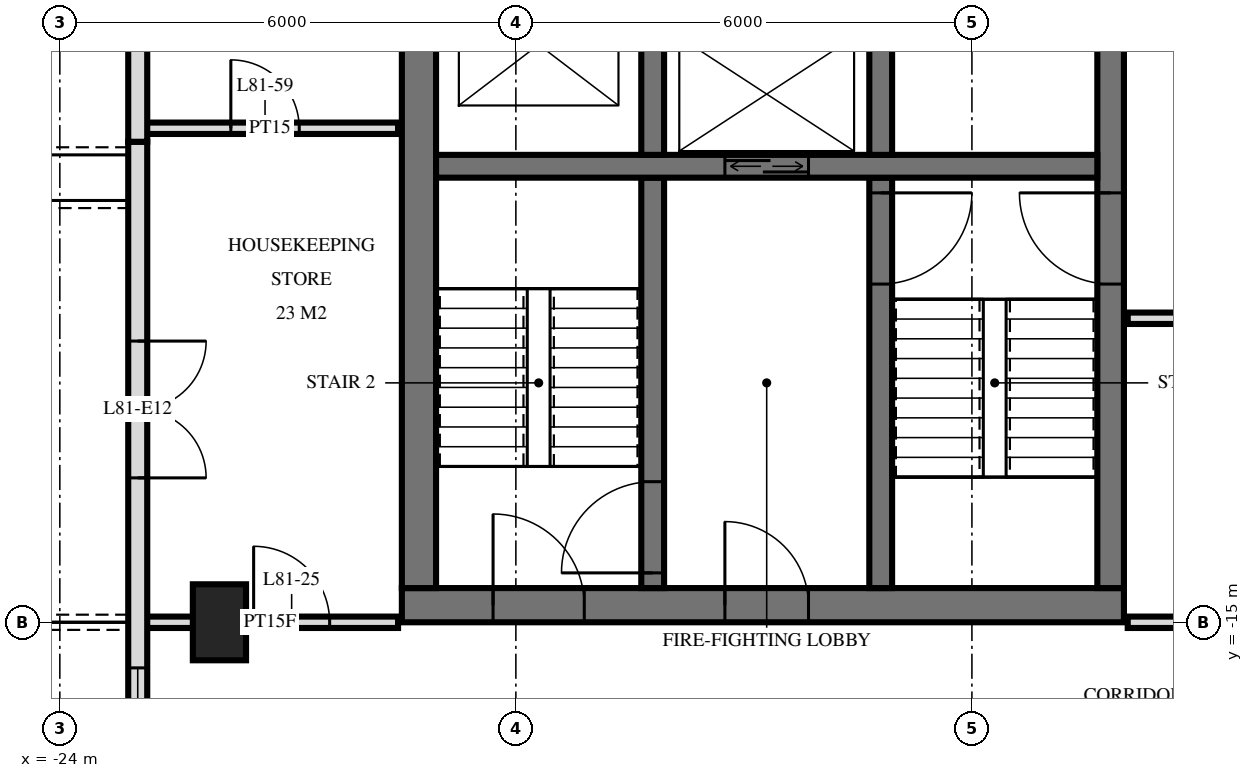
"""IFC4 building model, lengths in metres.
Left out: names, types, materials, properties, quantities, classifications, styles, units other than length and angle.
Written with IfcOpenShell. Run it as: python <this file> out.ifc"""

import sys

from ifc_helpers import new_model, si_unit, direction, frame, frame_2d, origin, origin_2d, place, context, subcontext, project, spatial, rectangle, extrude, element, fill, save


model = new_model("IFC4")
c1 = context("Model", 3, precision=1e-05, world=origin(), true_north=direction((0.0, 1.0)))
c2 = subcontext(c1, "Body", "Model", "MODEL_VIEW")
j1 = project(units=[si_unit("LENGTHUNIT", "METRE"), si_unit("PLANEANGLEUNIT", "RADIAN")], contexts=[c1])
p1 = place(None, origin())
s1 = spatial("IfcSite", under=j1, at=p1, CompositionType="ELEMENT")
p2 = place(p1, origin())
s2 = spatial("IfcBuilding", under=s1, at=p2, CompositionType="ELEMENT")
p3 = place(p2, frame((0.0, 0.0, 305.1)))
s3 = spatial("IfcBuildingStorey", under=s2, at=p3, CompositionType="ELEMENT", Elevation=305.1)
p4 = place(p3, frame((-21.9, -15.0, 0.0), z_axis=(0.0, 0.0, 1.0), x_axis=(0.0, 1.0, 0.0)))
e1 = element("IfcColumn", 1, at=p4, inside=s3, PredefinedType="COLUMN", context=c2, shape_type="SweptSolid", body=[
    extrude(rectangle(XDim=1.0, YDim=0.7, at=origin_2d()), origin(), (0.0, 0.0, 1.0), 3.5),
])
p5 = place(p3, frame((-19.5, -14.775, 0.0), z_axis=(0.0, 0.0, 1.0), x_axis=(1.0, 0.0, 0.0)))
e2 = element("IfcWall", 2, at=p5, inside=s3, PredefinedType="SHEAR", context=c2, shape_type="SweptSolid", body=[
    extrude(rectangle(XDim=9.5, YDim=0.45, at=frame_2d((4.75, 0.0))), origin(), (0.0, 0.0, 1.0), 3.5),
])
p6 = place(p5, frame((1.2, 0.0, 0.0)))
e3 = element("IfcOpeningElement", 3, at=p6, cuts=e2, PredefinedType="OPENING", context=c2, shape_type="SweptSolid", body=[
    extrude(rectangle(XDim=1.2, YDim=2.1, at=frame_2d((0.6, 1.05))), frame((0.0, 0.235, 0.0), z_axis=(0.0, -1.0, 0.0), x_axis=(1.0, 0.0, 0.0)), (0.0, 0.0, 1.0), 0.47),
])
p7 = place(p5, frame((4.25, 0.0, 0.0)))
e4 = element("IfcOpeningElement", 4, at=p7, cuts=e2, PredefinedType="OPENING", context=c2, shape_type="SweptSolid", body=[
    extrude(rectangle(XDim=1.1, YDim=2.1, at=frame_2d((0.55, 1.05))), frame((0.0, 0.235, 0.0), z_axis=(0.0, -1.0, 0.0), x_axis=(1.0, 0.0, 0.0)), (0.0, 0.0, 1.0), 0.47),
])
p8 = place(p3, frame((-10.175, -14.55, 0.0), z_axis=(0.0, 0.0, 1.0), x_axis=(0.0, 1.0, 0.0)))
e5 = element("IfcWall", 5, at=p8, inside=s3, PredefinedType="SHEAR", context=c2, shape_type="SweptSolid", body=[
    extrude(rectangle(XDim=14.1, YDim=0.35, at=frame_2d((7.05, 0.0))), origin(), (0.0, 0.0, 1.0), 3.5),
])
p9 = place(p8, frame((8.4, 0.0, 0.0)))
e6 = element("IfcOpeningElement", 6, at=p9, cuts=e5, PredefinedType="OPENING", context=c2, shape_type="SweptSolid", body=[
    extrude(rectangle(XDim=1.4, YDim=2.4, at=frame_2d((0.7, 1.2))), frame((0.0, 0.185, 0.0), z_axis=(0.0, -1.0, 0.0), x_axis=(1.0, 0.0, 0.0)), (0.0, 0.0, 1.0), 0.37),
])
p10 = place(p8, frame((10.0, 0.0, 0.0)))
e7 = element("IfcOpeningElement", 7, at=p10, cuts=e5, PredefinedType="OPENING", context=c2, shape_type="SweptSolid", body=[
    extrude(rectangle(XDim=1.4, YDim=2.4, at=frame_2d((0.7, 1.2))), frame((0.0, 0.185, 0.0), z_axis=(0.0, -1.0, 0.0), x_axis=(1.0, 0.0, 0.0)), (0.0, 0.0, 1.0), 0.37),
])
p11 = place(p8, frame((4.0, 0.0, 0.0)))
e8 = element("IfcOpeningElement", 8, at=p11, cuts=e5, PredefinedType="OPENING", context=c2, shape_type="SweptSolid", body=[
    extrude(rectangle(XDim=1.2, YDim=2.1, at=frame_2d((0.6, 1.05))), frame((0.0, 0.185, 0.0), z_axis=(0.0, -1.0, 0.0), x_axis=(1.0, 0.0, 0.0)), (0.0, 0.0, 1.0), 0.37),
])
p12 = place(p3, frame((-19.275, -14.55, 0.0), z_axis=(0.0, 0.0, 1.0), x_axis=(0.0, 1.0, 0.0)))
e9 = element("IfcWall", 9, at=p12, inside=s3, PredefinedType="SHEAR", context=c2, shape_type="SweptSolid", body=[
    extrude(rectangle(XDim=14.1, YDim=0.45, at=frame_2d((7.05, 0.0))), origin(), (0.0, 0.0, 1.0), 3.5),
])
p13 = place(p3, frame((-19.05, -9.0, 0.0), z_axis=(0.0, 0.0, 1.0), x_axis=(1.0, 0.0, 0.0)))
e10 = element("IfcWall", 10, at=p13, inside=s3, PredefinedType="SHEAR", context=c2, shape_type="SweptSolid", body=[
    extrude(rectangle(XDim=8.7, YDim=0.3, at=frame_2d((4.35, 0.0))), origin(), (0.0, 0.0, 1.0), 3.5),
])
p14 = place(p13, frame((3.8, 0.0, 0.0)))
e11 = element("IfcOpeningElement", 11, at=p14, cuts=e10, PredefinedType="OPENING", context=c2, shape_type="SweptSolid", body=[
    extrude(rectangle(XDim=1.1, YDim=2.1, at=frame_2d((0.55, 1.05))), frame((0.0, 0.16, 0.0), z_axis=(0.0, -1.0, 0.0), x_axis=(1.0, 0.0, 0.0)), (0.0, 0.0, 1.0), 0.32),
])
p15 = place(p3, frame((-13.2, -8.85, 0.0), z_axis=(0.0, 0.0, 1.0), x_axis=(0.0, 1.0, 0.0)))
e12 = element("IfcWall", 12, at=p15, inside=s3, PredefinedType="SHEAR", context=c2, shape_type="SweptSolid", body=[
    extrude(rectangle(XDim=2.3, YDim=0.3, at=frame_2d((1.15, 0.0))), origin(), (0.0, 0.0, 1.0), 3.5),
])
p16 = place(p3, frame((-13.2, -14.55, 0.0), z_axis=(0.0, 0.0, 1.0), x_axis=(0.0, 1.0, 0.0)))
e13 = element("IfcWall", 13, at=p16, inside=s3, PredefinedType="SHEAR", context=c2, shape_type="SweptSolid", body=[
    extrude(rectangle(XDim=5.4, YDim=0.3, at=frame_2d((2.7, 0.0))), origin(), (0.0, 0.0, 1.0), 3.5),
])
p17 = place(p16, frame((4.0, 0.0, 0.0)))
e14 = element("IfcOpeningElement", 14, at=p17, cuts=e13, PredefinedType="OPENING", context=c2, shape_type="SweptSolid", body=[
    extrude(rectangle(XDim=1.2, YDim=2.1, at=frame_2d((0.6, 1.05))), frame((0.0, 0.16, 0.0), z_axis=(0.0, -1.0, 0.0), x_axis=(1.0, 0.0, 0.0)), (0.0, 0.0, 1.0), 0.32),
])
p18 = place(p3, frame((-16.2, -8.85, 0.0), z_axis=(0.0, 0.0, 1.0), x_axis=(0.0, 1.0, 0.0)))
e15 = element("IfcWall", 15, at=p18, inside=s3, PredefinedType="SHEAR", context=c2, shape_type="SweptSolid", body=[
    extrude(rectangle(XDim=2.3, YDim=0.3, at=frame_2d((1.15, 0.0))), origin(), (0.0, 0.0, 1.0), 3.5),
])
p19 = place(p3, frame((-16.2, -14.55, 0.0), z_axis=(0.0, 0.0, 1.0), x_axis=(0.0, 1.0, 0.0)))
e16 = element("IfcWall", 16, at=p19, inside=s3, PredefinedType="SHEAR", context=c2, shape_type="SweptSolid", body=[
    extrude(rectangle(XDim=5.4, YDim=0.3, at=frame_2d((2.7, 0.0))), origin(), (0.0, 0.0, 1.0), 3.5),
])
p20 = place(p19, frame((0.2, 0.0, 0.0)))
e17 = element("IfcOpeningElement", 17, at=p20, cuts=e16, PredefinedType="OPENING", context=c2, shape_type="SweptSolid", body=[
    extrude(rectangle(XDim=1.2, YDim=2.1, at=frame_2d((0.6, 1.05))), frame((0.0, 0.16, 0.0), z_axis=(0.0, -1.0, 0.0), x_axis=(1.0, 0.0, 0.0)), (0.0, 0.0, 1.0), 0.32),
])
p21 = place(p3, frame((-22.92, -15.0, 0.0), z_axis=(0.0, 0.0, 1.0), x_axis=(1.0, 0.0, 0.0)))
e18 = element("IfcWall", 18, at=p21, inside=s3, PredefinedType="PARTITIONING", context=c2, shape_type="SweptSolid", body=[
    extrude(rectangle(XDim=3.37, YDim=0.15, at=frame_2d((1.685, 0.0))), origin(), (0.0, 0.0, 1.0), 3.22),
])
p22 = place(p21, frame((1.47, 0.0, 0.0)))
e19 = element("IfcOpeningElement", 19, at=p22, cuts=e18, PredefinedType="OPENING", context=c2, shape_type="SweptSolid", body=[
    extrude(rectangle(XDim=1.0, YDim=2.1, at=frame_2d((0.5, 1.05))), frame((0.0, 0.085, 0.0), z_axis=(0.0, -1.0, 0.0), x_axis=(1.0, 0.0, 0.0)), (0.0, 0.0, 1.0), 0.17),
])
p23 = place(p3, frame((-9.95, -15.0, 0.0), z_axis=(0.0, 0.0, 1.0), x_axis=(1.0, 0.0, 0.0)))
e20 = element("IfcWall", 20, at=p23, inside=s3, PredefinedType="PARTITIONING", context=c2, shape_type="SweptSolid", body=[
    extrude(rectangle(XDim=19.9, YDim=0.15, at=frame_2d((9.95, 0.0))), origin(), (0.0, 0.0, 1.0), 3.22),
])
p24 = place(p23, frame((9.45, 0.0, 0.0)))
e21 = element("IfcOpeningElement", 21, at=p24, cuts=e20, PredefinedType="OPENING", context=c2, shape_type="SweptSolid", body=[
    extrude(rectangle(XDim=1.0, YDim=2.1, at=frame_2d((0.5, 1.05))), frame((0.0, 0.085, 0.0), z_axis=(0.0, -1.0, 0.0), x_axis=(1.0, 0.0, 0.0)), (0.0, 0.0, 1.0), 0.17),
])
p25 = place(p3, frame((-9.95, -11.0, 0.0), z_axis=(0.0, 0.0, 1.0), x_axis=(1.0, 0.0, 0.0)))
e22 = element("IfcWall", 22, at=p25, inside=s3, PredefinedType="PARTITIONING", context=c2, shape_type="SweptSolid", body=[
    extrude(rectangle(XDim=19.9, YDim=0.15, at=frame_2d((9.95, 0.0))), origin(), (0.0, 0.0, 1.0), 3.22),
])
p26 = place(p25, frame((9.45, 0.0, 0.0)))
e23 = element("IfcOpeningElement", 23, at=p26, cuts=e22, PredefinedType="OPENING", context=c2, shape_type="SweptSolid", body=[
    extrude(rectangle(XDim=1.0, YDim=2.1, at=frame_2d((0.5, 1.05))), frame((0.0, 0.085, 0.0), z_axis=(0.0, -1.0, 0.0), x_axis=(1.0, 0.0, 0.0)), (0.0, 0.0, 1.0), 0.17),
])
p27 = place(p25, frame((3.45, 0.0, 0.0)))
e24 = element("IfcOpeningElement", 24, at=p27, cuts=e22, PredefinedType="OPENING", context=c2, shape_type="SweptSolid", body=[
    extrude(rectangle(XDim=1.0, YDim=2.1, at=frame_2d((0.5, 1.05))), frame((0.0, 0.085, 0.0), z_axis=(0.0, -1.0, 0.0), x_axis=(1.0, 0.0, 0.0)), (0.0, 0.0, 1.0), 0.17),
])
p28 = place(p3, frame((-22.92, -8.5, 0.0), z_axis=(0.0, 0.0, 1.0), x_axis=(1.0, 0.0, 0.0)))
e25 = element("IfcWall", 25, at=p28, inside=s3, PredefinedType="PARTITIONING", context=c2, shape_type="SweptSolid", body=[
    extrude(rectangle(XDim=3.37, YDim=0.15, at=frame_2d((1.685, 0.0))), origin(), (0.0, 0.0, 1.0), 3.22),
])
p29 = place(p28, frame((1.17, 0.0, 0.0)))
e26 = element("IfcOpeningElement", 26, at=p29, cuts=e25, PredefinedType="OPENING", context=c2, shape_type="SweptSolid", body=[
    extrude(rectangle(XDim=0.9, YDim=2.1, at=frame_2d((0.45, 1.05))), frame((0.0, 0.085, 0.0), z_axis=(0.0, -1.0, 0.0), x_axis=(1.0, 0.0, 0.0)), (0.0, 0.0, 1.0), 0.17),
])
p30 = place(p3, frame((-22.975, -5.05, 0.0), z_axis=(0.0, 0.0, 1.0), x_axis=(0.0, -1.0, 0.0)))
e27 = element("IfcWall", 27, at=p30, inside=s3, PredefinedType="SOLIDWALL", context=c2, shape_type="SweptSolid", body=[
    extrude(rectangle(XDim=3.628, YDim=0.25, at=frame_2d((1.814, 0.0))), origin(), (0.0, 0.0, 1.0), 2.837),
])
p31 = place(p30, origin())
e28 = element("IfcOpeningElement", 28, at=p31, cuts=e27, PredefinedType="OPENING", context=c2, shape_type="SweptSolid", body=[
    extrude(rectangle(XDim=1.8, YDim=2.4, at=frame_2d((0.9, 1.2))), frame((0.0, 0.135, 0.0), z_axis=(0.0, -1.0, 0.0), x_axis=(1.0, 0.0, 0.0)), (0.0, 0.0, 1.0), 0.27),
])
p32 = place(p3, frame((-22.975, -8.678, 0.0), z_axis=(0.0, 0.0, 1.0), x_axis=(0.0, -1.0, 0.0)))
e29 = element("IfcWall", 29, at=p32, inside=s3, PredefinedType="SOLIDWALL", context=c2, shape_type="SweptSolid", body=[
    extrude(rectangle(XDim=20.598, YDim=0.25, at=frame_2d((10.299, 0.0))), origin(), (0.0, 0.0, 1.0), 3.2),
])
p33 = place(p32, frame((2.622, 0.0, 0.0)))
e30 = element("IfcOpeningElement", 30, at=p33, cuts=e29, PredefinedType="OPENING", context=c2, shape_type="SweptSolid", body=[
    extrude(rectangle(XDim=1.8, YDim=2.4, at=frame_2d((0.9, 1.2))), frame((0.0, 0.135, 0.0), z_axis=(0.0, -1.0, 0.0), x_axis=(1.0, 0.0, 0.0)), (0.0, 0.0, 1.0), 0.27),
])
p34 = place(p32, frame((6.922, 0.0, 0.9)))
e31 = element("IfcOpeningElement", 31, at=p34, cuts=e29, PredefinedType="OPENING", context=c2, shape_type="SweptSolid", body=[
    extrude(rectangle(XDim=1.2, YDim=1.5, at=frame_2d((0.6, 0.75))), frame((0.0, 0.135, 0.0), z_axis=(0.0, -1.0, 0.0), x_axis=(1.0, 0.0, 0.0)), (0.0, 0.0, 1.0), 0.27),
])
p35 = place(p32, frame((9.922, 0.0, 0.0)))
e32 = element("IfcOpeningElement", 32, at=p35, cuts=e29, PredefinedType="OPENING", context=c2, shape_type="SweptSolid", body=[
    extrude(rectangle(XDim=1.8, YDim=2.4, at=frame_2d((0.9, 1.2))), frame((0.0, 0.135, 0.0), z_axis=(0.0, -1.0, 0.0), x_axis=(1.0, 0.0, 0.0)), (0.0, 0.0, 1.0), 0.27),
])
p36 = place(p32, frame((15.722, 0.0, 0.0)))
e33 = element("IfcOpeningElement", 33, at=p36, cuts=e29, PredefinedType="OPENING", context=c2, shape_type="SweptSolid", body=[
    extrude(rectangle(XDim=1.8, YDim=2.4, at=frame_2d((0.9, 1.2))), frame((0.0, 0.135, 0.0), z_axis=(0.0, -1.0, 0.0), x_axis=(1.0, 0.0, 0.0)), (0.0, 0.0, 1.0), 0.27),
])
p37 = place(p32, frame((18.472, 0.0, 0.9)))
e34 = element("IfcOpeningElement", 34, at=p37, cuts=e29, PredefinedType="OPENING", context=c2, shape_type="SweptSolid", body=[
    extrude(rectangle(XDim=1.8, YDim=1.5, at=frame_2d((0.9, 0.75))), frame((0.0, 0.135, 0.0), z_axis=(0.0, -1.0, 0.0), x_axis=(1.0, 0.0, 0.0)), (0.0, 0.0, 1.0), 0.27),
])
p38 = place(p33, origin())
e35 = element("IfcDoor", 35, at=p38, inside=s3, OperationType="DOUBLE_DOOR_SINGLE_SWING", PredefinedType="DOOR", context=c2, shape_type="SweptSolid", body=[
    extrude(rectangle(XDim=1.8, YDim=2.4, at=frame_2d((0.9, 1.2))), frame((0.0, 0.025, 0.0), z_axis=(0.0, -1.0, 0.0), x_axis=(1.0, 0.0, 0.0)), (0.0, 0.0, 1.0), 0.05),
])
fill(e30, e35)
p39 = place(p34, origin())
e36 = element("IfcWindow", 36, at=p39, inside=s3, PartitioningType="SINGLE_PANEL", PredefinedType="WINDOW", context=c2, shape_type="SweptSolid", body=[
    extrude(rectangle(XDim=1.2, YDim=1.5, at=frame_2d((0.6, 0.75))), frame((0.0, 0.03, 0.0), z_axis=(0.0, -1.0, 0.0), x_axis=(1.0, 0.0, 0.0)), (0.0, 0.0, 1.0), 0.06),
])
fill(e31, e36)
p40 = place(p14, origin())
e37 = element("IfcDoor", 37, at=p40, inside=s3, OperationType="DOUBLE_DOOR_SLIDING", PredefinedType="USERDEFINED", context=c2, shape_type="SweptSolid", body=[
    extrude(rectangle(XDim=1.1, YDim=2.1, at=frame_2d((0.55, 1.05))), frame((0.0, 0.025, 0.0), z_axis=(0.0, -1.0, 0.0), x_axis=(1.0, 0.0, 0.0)), (0.0, 0.0, 1.0), 0.05),
])
fill(e11, e37)
p41 = place(p11, origin())
e38 = element("IfcDoor", 38, at=p41, inside=s3, OperationType="SINGLE_SWING_LEFT", PredefinedType="DOOR", context=c2, shape_type="SweptSolid", body=[
    extrude(rectangle(XDim=1.2, YDim=2.1, at=frame_2d((0.6, 1.05))), frame((0.0, 0.025, 0.0), z_axis=(0.0, -1.0, 0.0), x_axis=(1.0, 0.0, 0.0)), (0.0, 0.0, 1.0), 0.05),
])
fill(e8, e38)
p42 = place(p6, origin())
e39 = element("IfcDoor", 39, at=p42, inside=s3, OperationType="SINGLE_SWING_RIGHT", PredefinedType="DOOR", context=c2, shape_type="SweptSolid", body=[
    extrude(rectangle(XDim=1.2, YDim=2.1, at=frame_2d((0.6, 1.05))), frame((0.0, 0.025, 0.0), z_axis=(0.0, -1.0, 0.0), x_axis=(1.0, 0.0, 0.0)), (0.0, 0.0, 1.0), 0.05),
])
fill(e3, e39)
p43 = place(p7, origin())
e40 = element("IfcDoor", 40, at=p43, inside=s3, OperationType="SINGLE_SWING_RIGHT", PredefinedType="DOOR", context=c2, shape_type="SweptSolid", body=[
    extrude(rectangle(XDim=1.1, YDim=2.1, at=frame_2d((0.55, 1.05))), frame((0.0, 0.025, 0.0), z_axis=(0.0, -1.0, 0.0), x_axis=(1.0, 0.0, 0.0)), (0.0, 0.0, 1.0), 0.05),
])
fill(e4, e40)
p44 = place(p17, frame((0.6, 0.0, 0.0), z_axis=(0.0, 0.0, 1.0), x_axis=(-1.0, 0.0, 0.0)))
e41 = element("IfcDoor", 41, at=p44, inside=s3, OperationType="SINGLE_SWING_RIGHT", PredefinedType="DOOR", context=c2, shape_type="SweptSolid", body=[
    extrude(rectangle(XDim=1.2, YDim=2.1, at=frame_2d((0.0, 1.05))), frame((0.0, -0.025, 0.0), z_axis=(0.0, 1.0, 0.0), x_axis=(-1.0, 0.0, 0.0)), (0.0, 0.0, 1.0), 0.05),
])
fill(e14, e41)
p45 = place(p20, origin())
e42 = element("IfcDoor", 42, at=p45, inside=s3, OperationType="SINGLE_SWING_RIGHT", PredefinedType="DOOR", context=c2, shape_type="SweptSolid", body=[
    extrude(rectangle(XDim=1.2, YDim=2.1, at=frame_2d((0.6, 1.05))), frame((0.0, 0.025, 0.0), z_axis=(0.0, -1.0, 0.0), x_axis=(1.0, 0.0, 0.0)), (0.0, 0.0, 1.0), 0.05),
])
fill(e17, e42)
p46 = place(p22, origin())
e43 = element("IfcDoor", 43, at=p46, inside=s3, OperationType="SINGLE_SWING_RIGHT", PredefinedType="DOOR", context=c2, shape_type="SweptSolid", body=[
    extrude(rectangle(XDim=1.0, YDim=2.1, at=frame_2d((0.5, 1.05))), frame((0.0, 0.025, 0.0), z_axis=(0.0, -1.0, 0.0), x_axis=(1.0, 0.0, 0.0)), (0.0, 0.0, 1.0), 0.05),
])
fill(e19, e43)
p47 = place(p29, origin())
e44 = element("IfcDoor", 44, at=p47, inside=s3, OperationType="SINGLE_SWING_RIGHT", PredefinedType="DOOR", context=c2, shape_type="SweptSolid", body=[
    extrude(rectangle(XDim=0.9, YDim=2.1, at=frame_2d((0.45, 1.05))), frame((0.0, 0.025, 0.0), z_axis=(0.0, -1.0, 0.0), x_axis=(1.0, 0.0, 0.0)), (0.0, 0.0, 1.0), 0.05),
])
fill(e26, e44)
save(model, sys.argv[1])
